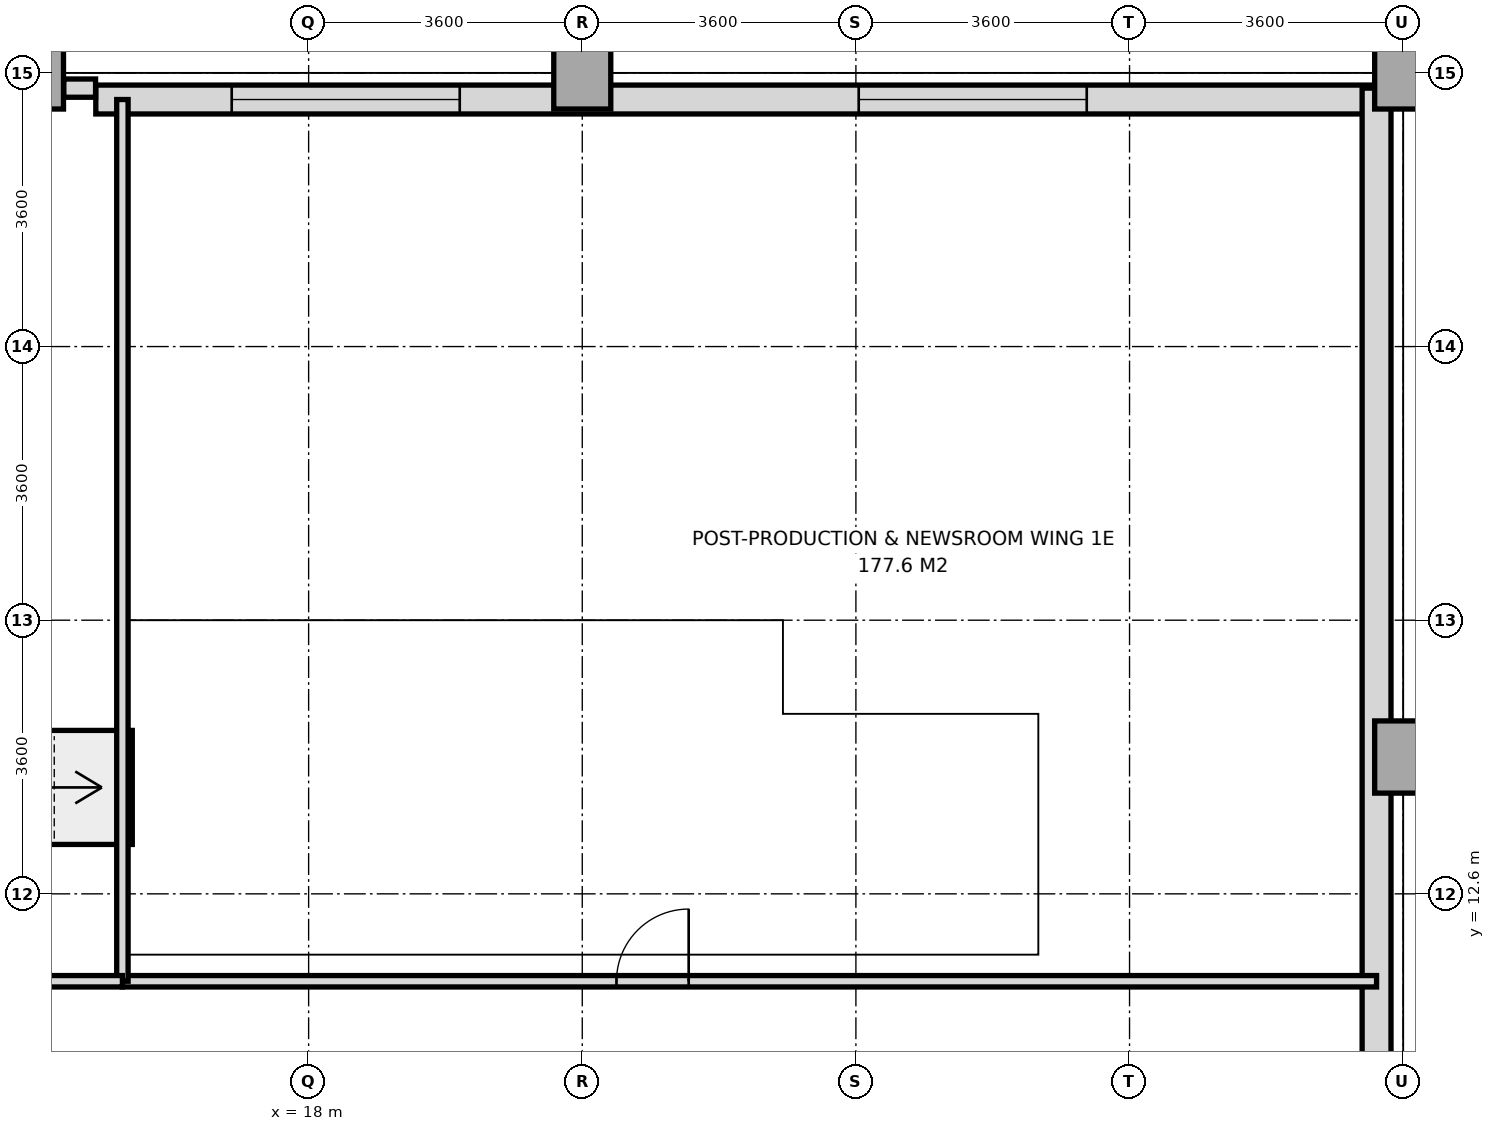
"""IFC4 building model, lengths in metres.
Left out: names, types, materials, properties, quantities, classifications, styles, units other than length and angle.
Written with IfcOpenShell. Run it as: python <this file> out.ifc"""

import sys

from ifc_helpers import new_model, si_unit, direction, frame, frame_2d, origin, origin_2d, place, context, subcontext, project, spatial, rectangle, extrude, source, transform, mapped, element, fill, save


model = new_model("IFC4")
c1 = context("Model", 3, precision=1e-05, world=origin(), true_north=direction((0.0, 1.0)))
c2 = subcontext(c1, "Body", "Model", "MODEL_VIEW")
j1 = project(units=[si_unit("LENGTHUNIT", "METRE"), si_unit("PLANEANGLEUNIT", "RADIAN")], contexts=[c1])
p1 = place(None, origin())
s1 = spatial("IfcSite", under=j1, at=p1, CompositionType="ELEMENT")
p2 = place(p1, origin())
s2 = spatial("IfcBuilding", under=s1, at=p2, CompositionType="ELEMENT")
p3 = place(p2, frame((0.0, 0.0, 5.4)))
s3 = spatial("IfcBuildingStorey", under=s2, at=p3, CompositionType="ELEMENT", Elevation=5.4)
m1 = source(origin(), c2, "Body", "SweptSolid", [
    extrude(rectangle(XDim=0.75, YDim=0.95, at=origin_2d()), origin(), (0.0, 0.0, 1.0), 4.52),
])
for number, where, z_axis, x_axis in (
    (1, (14.4, 23.4, 0.0), (0.0, 0.0, 1.0), (1.0, 0.0, 0.0)),
    (2, (21.6, 23.4, 0.0), (0.0, 0.0, 1.0), (1.0, 0.0, 0.0)),
    (3, (32.4, 14.4, 0.0), (0.0, 0.0, 1.0), (1.0, 0.0, 0.0)),
    (4, (32.4, 23.4, 0.0), (0.0, 0.0, 1.0), (1.0, 0.0, 0.0)),
):
    element("IfcColumn", number, at=place(p3, frame(where, z_axis=z_axis, x_axis=x_axis)), inside=s3, PredefinedType="COLUMN", context=c2, shape_type="MappedRepresentation", body=[
        mapped(m1, transform((0.0, 0.0, 0.0), x_axis=(1.0, 0.0, 0.0), y_axis=(0.0, 1.0, 0.0), z_axis=(0.0, 0.0, 1.0), scale=1.0)),
    ])
p4 = place(p3, frame((15.2, 23.05, 0.0), z_axis=(0.0, 0.0, 1.0), x_axis=(1.0, 0.0, 0.0)))
e5 = element("IfcWall", 5, at=p4, inside=s3, PredefinedType="SOLIDWALL", context=c2, shape_type="SweptSolid", body=[
    extrude(rectangle(XDim=16.85, YDim=0.38, at=frame_2d((8.425, 0.0))), origin(), (0.0, 0.0, 1.0), 3.77),
])
p5 = place(p4, frame((1.788, 0.0, 0.95)))
e6 = element("IfcOpeningElement", 6, at=p5, cuts=e5, PredefinedType="OPENING", context=c2, shape_type="SweptSolid", body=[
    extrude(rectangle(XDim=3.0, YDim=2.4, at=frame_2d((1.5, 1.2))), frame((0.0, 0.2, 0.0), z_axis=(0.0, -1.0, 0.0), x_axis=(1.0, 0.0, 0.0)), (0.0, 0.0, 1.0), 0.4),
])
p6 = place(p4, frame((10.037, 0.0, 0.95)))
e7 = element("IfcOpeningElement", 7, at=p6, cuts=e5, PredefinedType="OPENING", context=c2, shape_type="SweptSolid", body=[
    extrude(rectangle(XDim=3.0, YDim=2.4, at=frame_2d((1.5, 1.2))), frame((0.0, 0.2, 0.0), z_axis=(0.0, -1.0, 0.0), x_axis=(1.0, 0.0, 0.0)), (0.0, 0.0, 1.0), 0.4),
])
p7 = place(p3, frame((32.05, -18.8, 0.0), z_axis=(0.0, 0.0, 1.0), x_axis=(0.0, 1.0, 0.0)))
e8 = element("IfcWall", 8, at=p7, inside=s3, PredefinedType="SOLIDWALL", context=c2, shape_type="SweptSolid", body=[
    extrude(rectangle(XDim=42.0, YDim=0.38, at=frame_2d((21.0, 0.0))), origin(), (0.0, 0.0, 1.0), 3.77),
])
p8 = place(p7, frame((5.6, 0.0, 0.95)))
e9 = element("IfcOpeningElement", 9, at=p8, cuts=e8, PredefinedType="OPENING", context=c2, shape_type="SweptSolid", body=[
    extrude(rectangle(XDim=3.0, YDim=2.4, at=frame_2d((1.5, 1.2))), frame((0.0, 0.2, 0.0), z_axis=(0.0, -1.0, 0.0), x_axis=(1.0, 0.0, 0.0)), (0.0, 0.0, 1.0), 0.4),
])
p9 = place(p7, frame((12.8, 0.0, 0.95)))
e10 = element("IfcOpeningElement", 10, at=p9, cuts=e8, PredefinedType="OPENING", context=c2, shape_type="SweptSolid", body=[
    extrude(rectangle(XDim=3.0, YDim=2.4, at=frame_2d((1.5, 1.2))), frame((0.0, 0.2, 0.0), z_axis=(0.0, -1.0, 0.0), x_axis=(1.0, 0.0, 0.0)), (0.0, 0.0, 1.0), 0.4),
])
p10 = place(p7, frame((21.8, 0.0, 0.95)))
e11 = element("IfcOpeningElement", 11, at=p10, cuts=e8, PredefinedType="OPENING", context=c2, shape_type="SweptSolid", body=[
    extrude(rectangle(XDim=3.0, YDim=2.4, at=frame_2d((1.5, 1.2))), frame((0.0, 0.2, 0.0), z_axis=(0.0, -1.0, 0.0), x_axis=(1.0, 0.0, 0.0)), (0.0, 0.0, 1.0), 0.4),
])
p11 = place(p3, frame((14.778, 23.2, 0.0), z_axis=(0.0, 0.0, 1.0), x_axis=(1.0, 0.0, 0.0)))
e12 = element("IfcWall", 12, at=p11, inside=s3, PredefinedType="PARAPET", context=c2, shape_type="SweptSolid", body=[
    extrude(rectangle(XDim=0.419, YDim=0.24, at=frame_2d((0.209, 0.0))), origin(), (0.0, 0.0, 1.0), 1.15),
])
p12 = place(p3, frame((15.55, 11.45, 0.0), z_axis=(0.0, 0.0, 1.0), x_axis=(1.0, 0.0, 0.0)))
e13 = element("IfcWall", 13, at=p12, inside=s3, PredefinedType="PARTITIONING", context=c2, shape_type="SweptSolid", body=[
    extrude(rectangle(XDim=16.5, YDim=0.15, at=frame_2d((8.25, 0.0))), origin(), (0.0, 0.0, 1.0), 4.52),
])
p13 = place(p12, frame((6.5, 0.0, 0.0)))
e14 = element("IfcOpeningElement", 14, at=p13, cuts=e13, PredefinedType="OPENING", context=c2, shape_type="SweptSolid", body=[
    extrude(rectangle(XDim=0.95, YDim=2.15, at=frame_2d((0.475, 1.075))), frame((0.0, 0.085, 0.0), z_axis=(0.0, -1.0, 0.0), x_axis=(1.0, 0.0, 0.0)), (0.0, 0.0, 1.0), 0.17),
])
p14 = place(p3, frame((15.55, 11.45, 0.0), z_axis=(0.0, 0.0, 1.0), x_axis=(0.0, 1.0, 0.0)))
e15 = element("IfcWall", 15, at=p14, inside=s3, PredefinedType="PARTITIONING", context=c2, shape_type="SweptSolid", body=[
    extrude(rectangle(XDim=11.6, YDim=0.15, at=frame_2d((5.8, 0.0))), origin(), (0.0, 0.0, 1.0), 4.52),
])
p15 = place(p3, frame((10.6, 11.45, 0.0), z_axis=(0.0, 0.0, 1.0), x_axis=(1.0, 0.0, 0.0)))
e16 = element("IfcWall", 16, at=p15, inside=s3, PredefinedType="PARTITIONING", context=c2, shape_type="SweptSolid", body=[
    extrude(rectangle(XDim=4.95, YDim=0.15, at=frame_2d((2.475, 0.0))), origin(), (0.0, 0.0, 1.0), 3.92),
])
p16 = place(p15, frame((2.0, 0.0, 0.0)))
e17 = element("IfcOpeningElement", 17, at=p16, cuts=e16, PredefinedType="OPENING", context=c2, shape_type="SweptSolid", body=[
    extrude(rectangle(XDim=0.95, YDim=2.15, at=frame_2d((0.475, 1.075))), frame((0.0, 0.085, 0.0), z_axis=(0.0, -1.0, 0.0), x_axis=(1.0, 0.0, 0.0)), (0.0, 0.0, 1.0), 0.17),
])
m2 = source(origin(), c2, "Body", "SweptSolid", [
    extrude(rectangle(XDim=3.0, YDim=2.4, at=frame_2d((1.5, 1.2))), frame((0.0, 0.03, 0.0), z_axis=(0.0, -1.0, 0.0), x_axis=(1.0, 0.0, 0.0)), (0.0, 0.0, 1.0), 0.06),
])
p17 = place(p5, origin())
e18 = element("IfcWindow", 18, at=p17, inside=s3, PartitioningType="SINGLE_PANEL", PredefinedType="WINDOW", context=c2, shape_type="MappedRepresentation", body=[
    mapped(m2, transform((0.0, 0.0, 0.0), x_axis=(1.0, 0.0, 0.0), y_axis=(0.0, 1.0, 0.0), z_axis=(0.0, 0.0, 1.0), scale=1.0)),
])
fill(e6, e18)
p18 = place(p6, origin())
e19 = element("IfcWindow", 19, at=p18, inside=s3, PartitioningType="SINGLE_PANEL", PredefinedType="WINDOW", context=c2, shape_type="MappedRepresentation", body=[
    mapped(m2, transform((0.0, 0.0, 0.0), x_axis=(1.0, 0.0, 0.0), y_axis=(0.0, 1.0, 0.0), z_axis=(0.0, 0.0, 1.0), scale=1.0)),
])
fill(e7, e19)
m3 = source(origin(), c2, "Body", "SweptSolid", [
    extrude(rectangle(XDim=0.95, YDim=2.15, at=frame_2d((0.475, 1.075))), frame((0.0, 0.025, 0.0), z_axis=(0.0, -1.0, 0.0), x_axis=(1.0, 0.0, 0.0)), (0.0, 0.0, 1.0), 0.05),
])
p19 = place(p13, origin())
e20 = element("IfcDoor", 20, at=p19, inside=s3, OperationType="SINGLE_SWING_RIGHT", PredefinedType="DOOR", context=c2, shape_type="MappedRepresentation", body=[
    mapped(m3, transform((0.0, 0.0, 0.0), x_axis=(1.0, 0.0, 0.0), y_axis=(0.0, 1.0, 0.0), z_axis=(0.0, 0.0, 1.0), scale=1.0)),
])
fill(e14, e20)
save(model, sys.argv[1])
